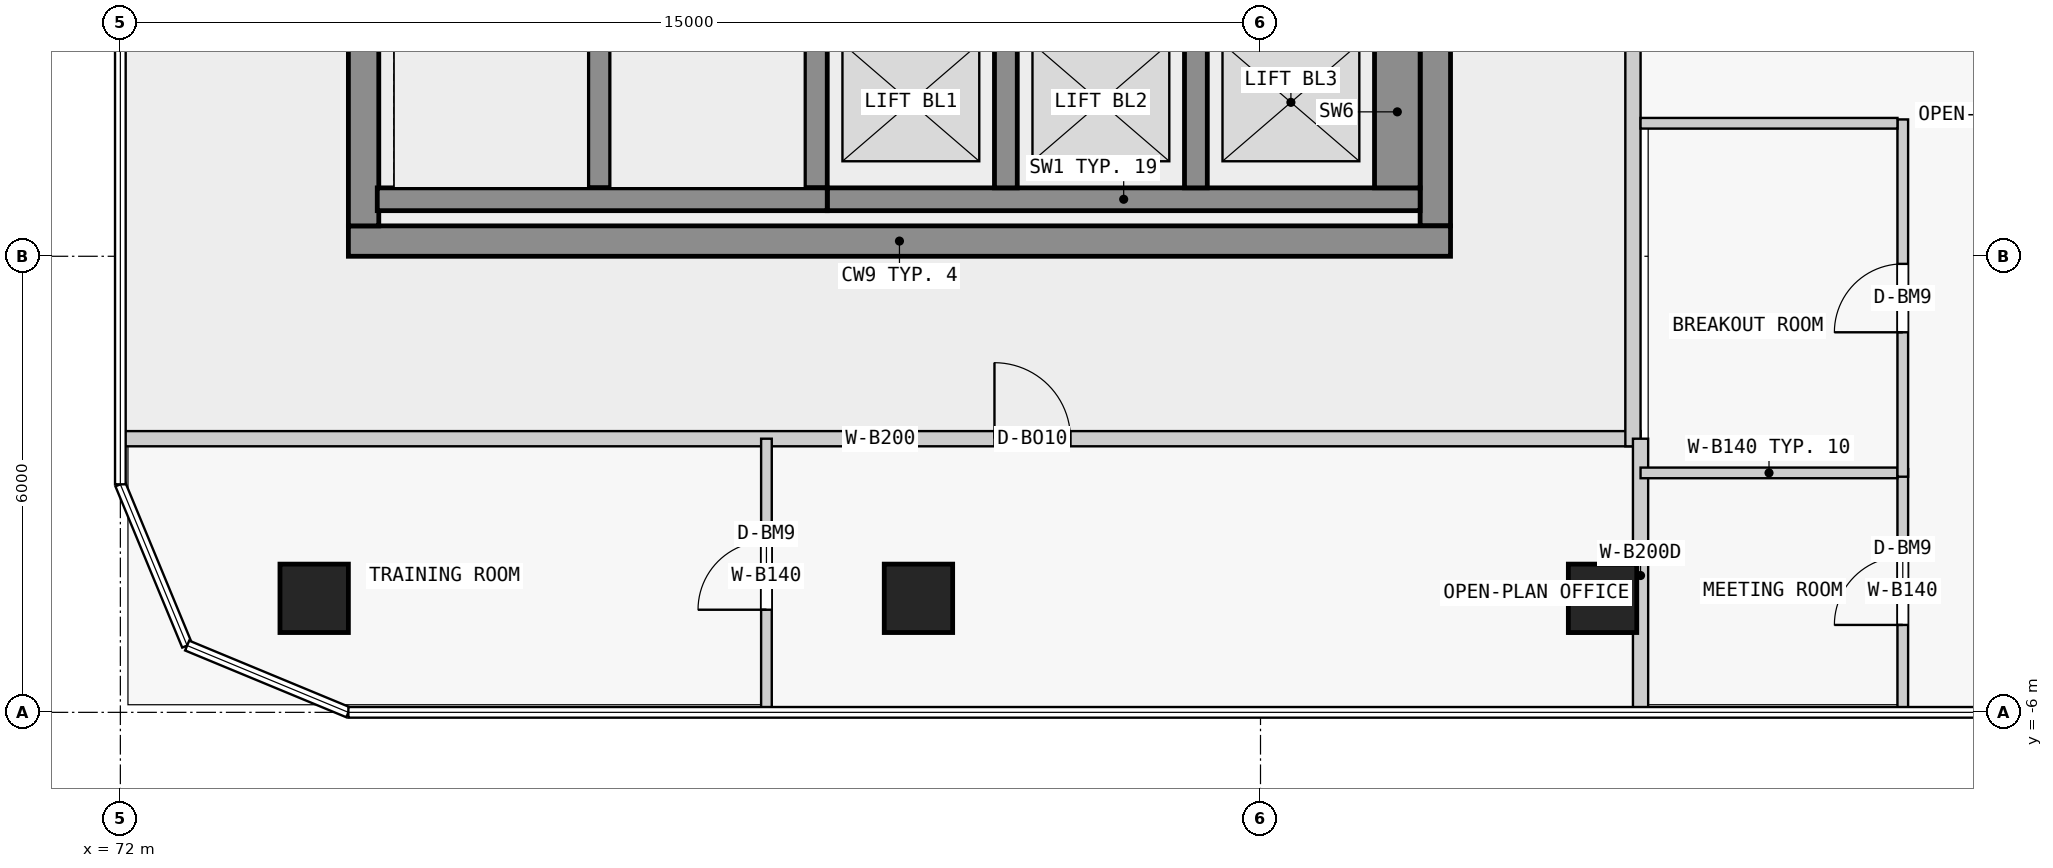
"""IFC4 building model, lengths in metres.
Left out: names, types, materials, properties, quantities, classifications, styles, units other than length and angle.
Written with IfcOpenShell. Run it as: python <this file> out.ifc"""

import sys

from ifc_helpers import new_model, si_unit, direction, frame, frame_2d, origin, origin_2d, place, context, subcontext, project, spatial, rectangle, extrude, element, fill, save


model = new_model("IFC4")
c1 = context("Model", 3, precision=1e-05, world=origin(), true_north=direction((0.0, 1.0)))
c2 = subcontext(c1, "Body", "Model", "MODEL_VIEW")
j1 = project(units=[si_unit("LENGTHUNIT", "METRE"), si_unit("PLANEANGLEUNIT", "RADIAN")], contexts=[c1])
p1 = place(None, origin())
s1 = spatial("IfcSite", under=j1, at=p1, CompositionType="ELEMENT")
p2 = place(p1, origin())
s2 = spatial("IfcBuilding", under=s1, at=p2, CompositionType="ELEMENT")
p3 = place(p2, frame((0.0, 0.0, 113.3)))
s3 = spatial("IfcBuildingStorey", under=s2, at=p3, CompositionType="ELEMENT", Elevation=113.3)
for number, where, z_axis, x_axis in (
    (1, (74.55, -4.5, 0.0), (0.0, 0.0, 1.0), (1.0, 0.0, 0.0)),
    (2, (82.5, -4.5, 0.0), (0.0, 0.0, 1.0), (1.0, 0.0, 0.0)),
    (3, (91.5, -4.5, 0.0), (0.0, 0.0, 1.0), (1.0, 0.0, 0.0)),
):
    element("IfcColumn", number, at=place(p3, frame(where, z_axis=z_axis, x_axis=x_axis)), inside=s3, PredefinedType="COLUMN", context=c2, shape_type="SweptSolid", body=[
        extrude(rectangle(XDim=0.9, YDim=0.9, at=origin_2d()), origin(), (0.0, 0.0, 1.0), 3.5),
    ])
p4 = place(p3, frame((75.0, 0.2, 0.0), z_axis=(0.0, 0.0, 1.0), x_axis=(1.0, 0.0, 0.0)))
e4 = element("IfcWall", 4, at=p4, inside=s3, PredefinedType="SHEAR", context=c2, shape_type="SweptSolid", body=[
    extrude(rectangle(XDim=14.5, YDim=0.4, at=frame_2d((7.25, 0.0))), origin(), (0.0, 0.0, 1.0), 3.25),
])
p5 = place(p3, frame((75.2, 0.4, 0.0), z_axis=(0.0, 0.0, 1.0), x_axis=(0.0, 1.0, 0.0)))
e5 = element("IfcWall", 5, at=p5, inside=s3, PredefinedType="SHEAR", context=c2, shape_type="SweptSolid", body=[
    extrude(rectangle(XDim=17.2, YDim=0.4, at=frame_2d((8.6, 0.0))), origin(), (0.0, 0.0, 1.0), 3.25),
])
p6 = place(p5, frame((7.9, 0.0, 0.0)))
e6 = element("IfcOpeningElement", 6, at=p6, cuts=e5, PredefinedType="OPENING", context=c2, shape_type="SweptSolid", body=[
    extrude(rectangle(XDim=1.8, YDim=2.1, at=frame_2d((0.9, 1.05))), frame((0.0, 0.21, 0.0), z_axis=(0.0, -1.0, 0.0), x_axis=(1.0, 0.0, 0.0)), (0.0, 0.0, 1.0), 0.42),
])
p7 = place(p3, frame((89.3, 0.4, 0.0), z_axis=(0.0, 0.0, 1.0), x_axis=(0.0, 1.0, 0.0)))
e7 = element("IfcWall", 7, at=p7, inside=s3, PredefinedType="SHEAR", context=c2, shape_type="SweptSolid", body=[
    extrude(rectangle(XDim=17.2, YDim=0.4, at=frame_2d((8.6, 0.0))), origin(), (0.0, 0.0, 1.0), 3.25),
])
p8 = place(p7, frame((7.7, 0.0, 0.0)))
e8 = element("IfcOpeningElement", 8, at=p8, cuts=e7, PredefinedType="OPENING", context=c2, shape_type="SweptSolid", body=[
    extrude(rectangle(XDim=1.8, YDim=2.1, at=frame_2d((0.9, 1.05))), frame((0.0, 0.21, 0.0), z_axis=(0.0, -1.0, 0.0), x_axis=(1.0, 0.0, 0.0)), (0.0, 0.0, 1.0), 0.42),
])
p9 = place(p7, frame((15.925, 0.0, 0.0)))
e9 = element("IfcOpeningElement", 9, at=p9, cuts=e7, PredefinedType="OPENING", context=c2, shape_type="SweptSolid", body=[
    extrude(rectangle(XDim=0.9, YDim=2.1, at=frame_2d((0.45, 1.05))), frame((0.0, 0.21, 0.0), z_axis=(0.0, -1.0, 0.0), x_axis=(1.0, 0.0, 0.0)), (0.0, 0.0, 1.0), 0.42),
])
p10 = place(p3, frame((75.38, 0.75, 0.0), z_axis=(0.0, 0.0, 1.0), x_axis=(1.0, 0.0, 0.0)))
e10 = element("IfcWall", 10, at=p10, inside=s3, PredefinedType="SHEAR", context=c2, shape_type="SweptSolid", body=[
    extrude(rectangle(XDim=5.92, YDim=0.3, at=frame_2d((2.96, 0.0))), origin(), (0.0, 0.0, 1.0), 3.25),
])
for number, where, z_axis, x_axis in (
    (11, (78.3, 0.9, 0.0), (0.0, 0.0, 1.0), (0.0, 1.0, 0.0)),
    (12, (81.15, 0.9, 0.0), (0.0, 0.0, 1.0), (0.0, 1.0, 0.0)),
):
    element("IfcWall", number, at=place(p3, frame(where, z_axis=z_axis, x_axis=x_axis)), inside=s3, PredefinedType="SHEAR", context=c2, shape_type="SweptSolid", body=[
        extrude(rectangle(XDim=6.4, YDim=0.3, at=frame_2d((3.2, 0.0))), origin(), (0.0, 0.0, 1.0), 3.25),
    ])
p11 = place(p3, frame((81.3, 0.75, 0.0), z_axis=(0.0, 0.0, 1.0), x_axis=(1.0, 0.0, 0.0)))
e13 = element("IfcWall", 13, at=p11, inside=s3, PredefinedType="SHEAR", context=c2, shape_type="SweptSolid", body=[
    extrude(rectangle(XDim=7.8, YDim=0.3, at=frame_2d((3.9, 0.0))), origin(), (0.0, 0.0, 1.0), 3.25),
])
for number, where, z_axis, x_axis in (
    (14, (83.65, 0.9, 0.0), (0.0, 0.0, 1.0), (0.0, 1.0, 0.0)),
    (15, (86.15, 0.9, 0.0), (0.0, 0.0, 1.0), (0.0, 1.0, 0.0)),
):
    element("IfcWall", number, at=place(p3, frame(where, z_axis=z_axis, x_axis=x_axis)), inside=s3, PredefinedType="SHEAR", context=c2, shape_type="SweptSolid", body=[
        extrude(rectangle(XDim=2.0, YDim=0.3, at=frame_2d((1.0, 0.0))), origin(), (0.0, 0.0, 1.0), 3.25),
    ])
p12 = place(p3, frame((88.8, 0.9, 0.0), z_axis=(0.0, 0.0, 1.0), x_axis=(0.0, 1.0, 0.0)))
e16 = element("IfcWall", 16, at=p12, inside=s3, PredefinedType="SHEAR", context=c2, shape_type="SweptSolid", body=[
    extrude(rectangle(XDim=2.0, YDim=0.6, at=frame_2d((1.0, 0.0))), origin(), (0.0, 0.0, 1.0), 3.25),
])
p13 = place(p3, frame((72.0, -2.4, 0.0), z_axis=(0.0, 0.0, 1.0), x_axis=(1.0, 0.0, 0.0)))
e17 = element("IfcWall", 17, at=p13, inside=s3, PredefinedType="PARTITIONING", context=c2, shape_type="SweptSolid", body=[
    extrude(rectangle(XDim=20.0, YDim=0.2, at=frame_2d((10.0, 0.0))), origin(), (0.0, 0.0, 1.0), 3.25),
])
p14 = place(p13, frame((11.5, 0.0, 0.0)))
e18 = element("IfcOpeningElement", 18, at=p14, cuts=e17, PredefinedType="OPENING", context=c2, shape_type="SweptSolid", body=[
    extrude(rectangle(XDim=1.0, YDim=2.4, at=frame_2d((0.5, 1.2))), frame((0.0, 0.11, 0.0), z_axis=(0.0, -1.0, 0.0), x_axis=(1.0, 0.0, 0.0)), (0.0, 0.0, 1.0), 0.22),
])
p15 = place(p3, frame((91.9, -2.5, 0.0), z_axis=(0.0, 0.0, 1.0), x_axis=(0.0, 1.0, 0.0)))
e19 = element("IfcWall", 19, at=p15, inside=s3, PredefinedType="PARTITIONING", context=c2, shape_type="SweptSolid", body=[
    extrude(rectangle(XDim=12.1, YDim=0.2, at=frame_2d((6.05, 0.0))), origin(), (0.0, 0.0, 1.0), 3.25),
])
p16 = place(p15, frame((8.3, 0.0, 0.0)))
e20 = element("IfcOpeningElement", 20, at=p16, cuts=e19, PredefinedType="OPENING", context=c2, shape_type="SweptSolid", body=[
    extrude(rectangle(XDim=1.4, YDim=2.4, at=frame_2d((0.7, 1.2))), frame((0.0, 0.11, 0.0), z_axis=(0.0, -1.0, 0.0), x_axis=(1.0, 0.0, 0.0)), (0.0, 0.0, 1.0), 0.22),
])
p17 = place(p3, frame((92.0, -6.0, 0.0), z_axis=(0.0, 0.0, 1.0), x_axis=(0.0, 1.0, 0.0)))
e21 = element("IfcWall", 21, at=p17, inside=s3, PredefinedType="PARTITIONING", context=c2, shape_type="SweptSolid", body=[
    extrude(rectangle(XDim=3.6, YDim=0.2, at=frame_2d((1.8, 0.0))), origin(), (0.0, 0.0, 1.0), 3.25),
])
p18 = place(p3, frame((80.5, -6.0, 0.0), z_axis=(0.0, 0.0, 1.0), x_axis=(0.0, 1.0, 0.0)))
e22 = element("IfcWall", 22, at=p18, inside=s3, PredefinedType="PARTITIONING", context=c2, shape_type="SweptSolid", body=[
    extrude(rectangle(XDim=3.6, YDim=0.14, at=frame_2d((1.8, 0.0))), origin(), (0.0, 0.0, 1.0), 3.25),
])
p19 = place(p18, frame((1.35, 0.0, 0.0)))
e23 = element("IfcOpeningElement", 23, at=p19, cuts=e22, PredefinedType="OPENING", context=c2, shape_type="SweptSolid", body=[
    extrude(rectangle(XDim=0.9, YDim=2.4, at=frame_2d((0.45, 1.2))), frame((0.0, 0.08, 0.0), z_axis=(0.0, -1.0, 0.0), x_axis=(1.0, 0.0, 0.0)), (0.0, 0.0, 1.0), 0.16),
])
p20 = place(p3, frame((95.45, -6.0, 0.0), z_axis=(0.0, 0.0, 1.0), x_axis=(0.0, 1.0, 0.0)))
e24 = element("IfcWall", 24, at=p20, inside=s3, PredefinedType="PARTITIONING", context=c2, shape_type="SweptSolid", body=[
    extrude(rectangle(XDim=3.2, YDim=0.14, at=frame_2d((1.6, 0.0))), origin(), (0.0, 0.0, 1.0), 3.2),
])
p21 = place(p20, frame((1.15, 0.0, 0.0)))
e25 = element("IfcOpeningElement", 25, at=p21, cuts=e24, PredefinedType="OPENING", context=c2, shape_type="SweptSolid", body=[
    extrude(rectangle(XDim=0.9, YDim=2.4, at=frame_2d((0.45, 1.2))), frame((0.0, 0.08, 0.0), z_axis=(0.0, -1.0, 0.0), x_axis=(1.0, 0.0, 0.0)), (0.0, 0.0, 1.0), 0.16),
])
p22 = place(p3, frame((92.0, -2.85, 0.0), z_axis=(0.0, 0.0, 1.0), x_axis=(1.0, 0.0, 0.0)))
e26 = element("IfcWall", 26, at=p22, inside=s3, PredefinedType="PARTITIONING", context=c2, shape_type="SweptSolid", body=[
    extrude(rectangle(XDim=3.38, YDim=0.14, at=frame_2d((1.69, 0.0))), origin(), (0.0, 0.0, 1.0), 3.2),
])
p23 = place(p3, frame((95.45, -2.9, 0.0), z_axis=(0.0, 0.0, 1.0), x_axis=(0.0, 1.0, 0.0)))
e27 = element("IfcWall", 27, at=p23, inside=s3, PredefinedType="PARTITIONING", context=c2, shape_type="SweptSolid", body=[
    extrude(rectangle(XDim=4.7, YDim=0.14, at=frame_2d((2.35, 0.0))), origin(), (0.0, 0.0, 1.0), 3.2),
])
p24 = place(p23, frame((1.9, 0.0, 0.0)))
e28 = element("IfcOpeningElement", 28, at=p24, cuts=e27, PredefinedType="OPENING", context=c2, shape_type="SweptSolid", body=[
    extrude(rectangle(XDim=0.9, YDim=2.4, at=frame_2d((0.45, 1.2))), frame((0.0, 0.08, 0.0), z_axis=(0.0, -1.0, 0.0), x_axis=(1.0, 0.0, 0.0)), (0.0, 0.0, 1.0), 0.16),
])
p25 = place(p3, frame((92.0, 1.75, 0.0), z_axis=(0.0, 0.0, 1.0), x_axis=(1.0, 0.0, 0.0)))
e29 = element("IfcWall", 29, at=p25, inside=s3, PredefinedType="PARTITIONING", context=c2, shape_type="SweptSolid", body=[
    extrude(rectangle(XDim=3.38, YDim=0.14, at=frame_2d((1.69, 0.0))), origin(), (0.0, 0.0, 1.0), 3.2),
])
p26 = place(p14, origin())
e30 = element("IfcDoor", 30, at=p26, inside=s3, OperationType="SINGLE_SWING_LEFT", PredefinedType="DOOR", context=c2, shape_type="SweptSolid", body=[
    extrude(rectangle(XDim=1.0, YDim=2.4, at=frame_2d((0.5, 1.2))), frame((0.0, 0.025, 0.0), z_axis=(0.0, -1.0, 0.0), x_axis=(1.0, 0.0, 0.0)), (0.0, 0.0, 1.0), 0.05),
])
fill(e18, e30)
p27 = place(p19, origin())
e31 = element("IfcDoor", 31, at=p27, inside=s3, OperationType="SINGLE_SWING_LEFT", PredefinedType="DOOR", context=c2, shape_type="SweptSolid", body=[
    extrude(rectangle(XDim=0.9, YDim=2.4, at=frame_2d((0.45, 1.2))), frame((0.0, 0.025, 0.0), z_axis=(0.0, -1.0, 0.0), x_axis=(1.0, 0.0, 0.0)), (0.0, 0.0, 1.0), 0.05),
])
fill(e23, e31)
p28 = place(p21, origin())
e32 = element("IfcDoor", 32, at=p28, inside=s3, OperationType="SINGLE_SWING_LEFT", PredefinedType="DOOR", context=c2, shape_type="SweptSolid", body=[
    extrude(rectangle(XDim=0.9, YDim=2.4, at=frame_2d((0.45, 1.2))), frame((0.0, 0.025, 0.0), z_axis=(0.0, -1.0, 0.0), x_axis=(1.0, 0.0, 0.0)), (0.0, 0.0, 1.0), 0.05),
])
fill(e25, e32)
p29 = place(p24, origin())
e33 = element("IfcDoor", 33, at=p29, inside=s3, OperationType="SINGLE_SWING_LEFT", PredefinedType="DOOR", context=c2, shape_type="SweptSolid", body=[
    extrude(rectangle(XDim=0.9, YDim=2.4, at=frame_2d((0.45, 1.2))), frame((0.0, 0.025, 0.0), z_axis=(0.0, -1.0, 0.0), x_axis=(1.0, 0.0, 0.0)), (0.0, 0.0, 1.0), 0.05),
])
fill(e28, e33)
save(model, sys.argv[1])
